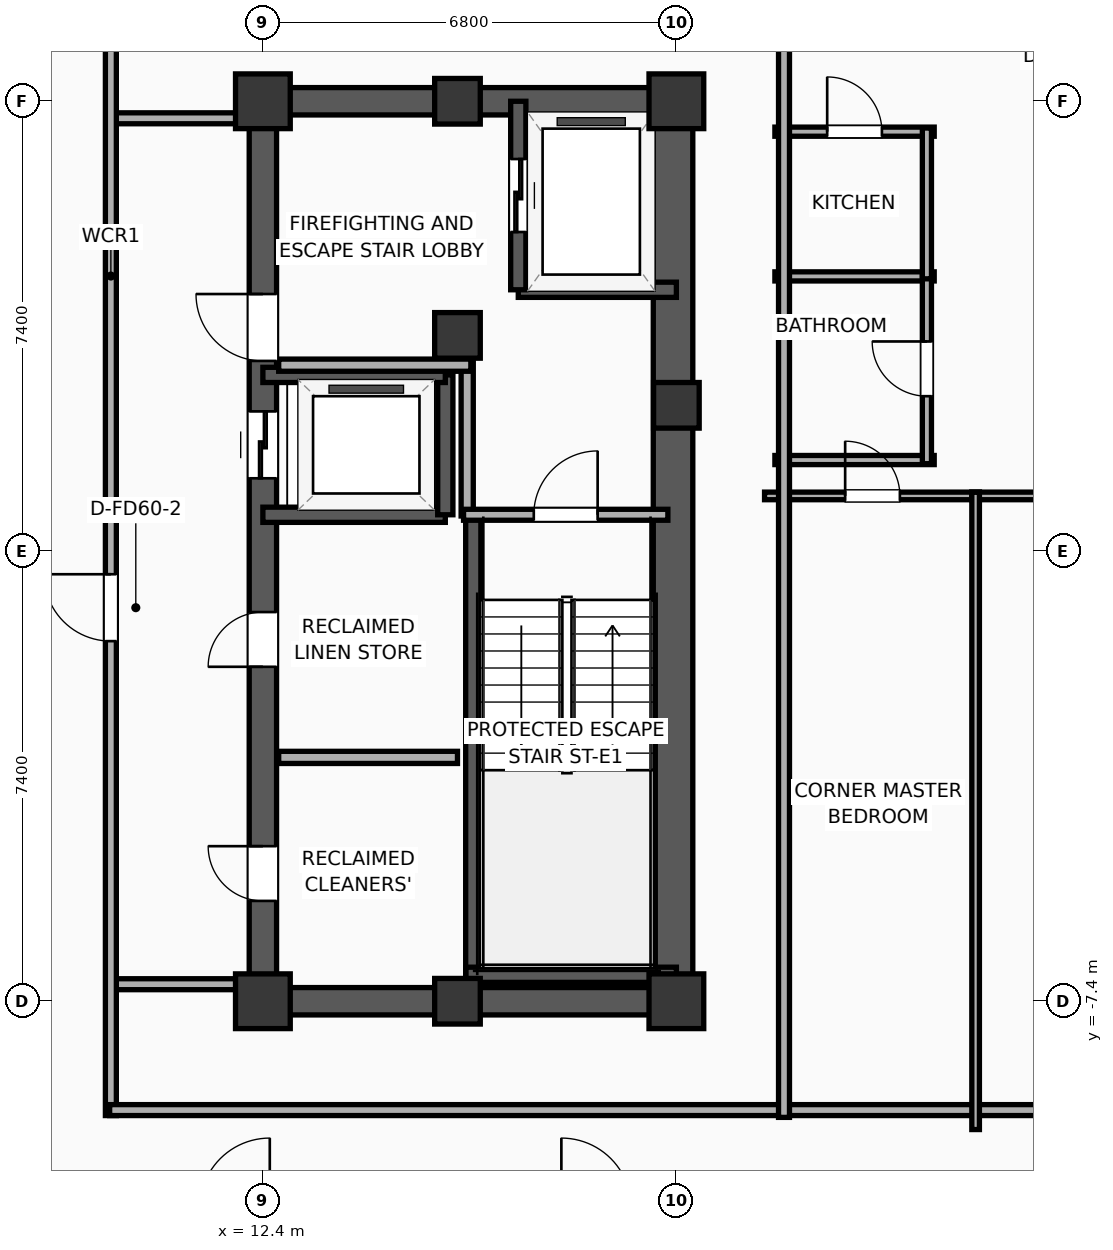
"""IFC4 building model, lengths in metres.
Left out: names, types, materials, properties, quantities, classifications, styles, units other than length and angle.
Written with IfcOpenShell. Run it as: python <this file> out.ifc"""

import sys

from ifc_helpers import new_model, si_unit, direction, frame, frame_2d, origin, origin_2d, place, context, subcontext, project, spatial, rectangle, extrude, element, fill, save


model = new_model("IFC4")
c1 = context("Model", 3, precision=1e-05, world=origin(), true_north=direction((0.0, 1.0)))
c2 = subcontext(c1, "Body", "Model", "MODEL_VIEW")
j1 = project(units=[si_unit("LENGTHUNIT", "METRE"), si_unit("PLANEANGLEUNIT", "RADIAN")], contexts=[c1])
p1 = place(None, origin())
s1 = spatial("IfcSite", under=j1, at=p1, CompositionType="ELEMENT")
p2 = place(p1, origin())
s2 = spatial("IfcBuilding", under=s1, at=p2, CompositionType="ELEMENT")
p3 = place(p2, frame((0.0, 0.0, 223.6)))
s3 = spatial("IfcBuildingStorey", under=s2, at=p3, CompositionType="ELEMENT", Elevation=223.6)
p4 = place(p3, frame((12.4, -7.4, 0.0), z_axis=(0.0, 0.0, 1.0), x_axis=(1.0, 0.0, 0.0)))
e1 = element("IfcColumn", 1, at=p4, inside=s3, PredefinedType="COLUMN", context=c2, shape_type="SweptSolid", body=[
    extrude(rectangle(XDim=0.9, YDim=0.9, at=origin_2d()), origin(), (0.0, 0.0, 1.0), 3.9),
])
p5 = place(p3, frame((15.6, 3.55, 0.0), z_axis=(0.0, 0.0, 1.0), x_axis=(1.0, 0.0, 0.0)))
e2 = element("IfcColumn", 2, at=p5, inside=s3, PredefinedType="COLUMN", context=c2, shape_type="SweptSolid", body=[
    extrude(rectangle(XDim=0.75, YDim=0.75, at=origin_2d()), origin(), (0.0, 0.0, 1.0), 3.9),
])
p6 = place(p3, frame((12.4, 7.4, 0.0), z_axis=(0.0, 0.0, 1.0), x_axis=(1.0, 0.0, 0.0)))
e3 = element("IfcColumn", 3, at=p6, inside=s3, PredefinedType="COLUMN", context=c2, shape_type="SweptSolid", body=[
    extrude(rectangle(XDim=0.9, YDim=0.9, at=origin_2d()), origin(), (0.0, 0.0, 1.0), 3.9),
])
for number, where, z_axis, x_axis in (
    (4, (15.6, -7.4, 0.0), (0.0, 0.0, 1.0), (1.0, 0.0, 0.0)),
    (5, (15.6, 7.4, 0.0), (0.0, 0.0, 1.0), (1.0, 0.0, 0.0)),
):
    element("IfcColumn", number, at=place(p3, frame(where, z_axis=z_axis, x_axis=x_axis)), inside=s3, PredefinedType="COLUMN", context=c2, shape_type="SweptSolid", body=[
        extrude(rectangle(XDim=0.75, YDim=0.75, at=origin_2d()), origin(), (0.0, 0.0, 1.0), 3.9),
    ])
p7 = place(p3, frame((19.2, -7.4, 0.0), z_axis=(0.0, 0.0, 1.0), x_axis=(1.0, 0.0, 0.0)))
e6 = element("IfcColumn", 6, at=p7, inside=s3, PredefinedType="COLUMN", context=c2, shape_type="SweptSolid", body=[
    extrude(rectangle(XDim=0.9, YDim=0.9, at=origin_2d()), origin(), (0.0, 0.0, 1.0), 3.9),
])
p8 = place(p3, frame((19.2, 2.4, 0.0), z_axis=(0.0, 0.0, 1.0), x_axis=(1.0, 0.0, 0.0)))
e7 = element("IfcColumn", 7, at=p8, inside=s3, PredefinedType="COLUMN", context=c2, shape_type="SweptSolid", body=[
    extrude(rectangle(XDim=0.75, YDim=0.75, at=origin_2d()), origin(), (0.0, 0.0, 1.0), 3.9),
])
p9 = place(p3, frame((19.2, 7.4, 0.0), z_axis=(0.0, 0.0, 1.0), x_axis=(1.0, 0.0, 0.0)))
e8 = element("IfcColumn", 8, at=p9, inside=s3, PredefinedType="COLUMN", context=c2, shape_type="SweptSolid", body=[
    extrude(rectangle(XDim=0.9, YDim=0.9, at=origin_2d()), origin(), (0.0, 0.0, 1.0), 3.9),
])
for number, where, z_axis, x_axis in (
    (9, (12.175, -7.4, 0.0), (0.0, 0.0, 1.0), (1.0, 0.0, 0.0)),
    (10, (12.175, 7.4, 0.0), (0.0, 0.0, 1.0), (1.0, 0.0, 0.0)),
):
    element("IfcWall", number, at=place(p3, frame(where, z_axis=z_axis, x_axis=x_axis)), inside=s3, PredefinedType="SHEAR", context=c2, shape_type="SweptSolid", body=[
        extrude(rectangle(XDim=7.25, YDim=0.45, at=frame_2d((3.625, 0.0))), origin(), (0.0, 0.0, 1.0), 3.65),
    ])
p10 = place(p3, frame((12.4, -7.4, 0.0), z_axis=(0.0, 0.0, 1.0), x_axis=(0.0, 1.0, 0.0)))
e11 = element("IfcWall", 11, at=p10, inside=s3, PredefinedType="SHEAR", context=c2, shape_type="SweptSolid", body=[
    extrude(rectangle(XDim=14.8, YDim=0.45, at=frame_2d((7.4, 0.0))), origin(), (0.0, 0.0, 1.0), 3.65),
])
p11 = place(p10, frame((8.6, 0.0, 0.0)))
e12 = element("IfcOpeningElement", 12, at=p11, cuts=e11, PredefinedType="OPENING", context=c2, shape_type="SweptSolid", body=[
    extrude(rectangle(XDim=1.1, YDim=2.05, at=frame_2d((0.55, 1.025))), frame((0.0, 0.235, 0.0), z_axis=(0.0, -1.0, 0.0), x_axis=(1.0, 0.0, 0.0)), (0.0, 0.0, 1.0), 0.47),
])
p12 = place(p10, frame((10.53, 0.0, 0.0)))
e13 = element("IfcOpeningElement", 13, at=p12, cuts=e11, PredefinedType="OPENING", context=c2, shape_type="SweptSolid", body=[
    extrude(rectangle(XDim=1.1, YDim=2.05, at=frame_2d((0.55, 1.025))), frame((0.0, 0.235, 0.0), z_axis=(0.0, -1.0, 0.0), x_axis=(1.0, 0.0, 0.0)), (0.0, 0.0, 1.0), 0.47),
])
p13 = place(p10, frame((1.65, 0.0, 0.0)))
e14 = element("IfcOpeningElement", 14, at=p13, cuts=e11, PredefinedType="OPENING", context=c2, shape_type="SweptSolid", body=[
    extrude(rectangle(XDim=0.9, YDim=2.05, at=frame_2d((0.45, 1.025))), frame((0.0, 0.235, 0.0), z_axis=(0.0, -1.0, 0.0), x_axis=(1.0, 0.0, 0.0)), (0.0, 0.0, 1.0), 0.47),
])
p14 = place(p10, frame((5.5, 0.0, 0.0)))
e15 = element("IfcOpeningElement", 15, at=p14, cuts=e11, PredefinedType="OPENING", context=c2, shape_type="SweptSolid", body=[
    extrude(rectangle(XDim=0.9, YDim=2.05, at=frame_2d((0.45, 1.025))), frame((0.0, 0.235, 0.0), z_axis=(0.0, -1.0, 0.0), x_axis=(1.0, 0.0, 0.0)), (0.0, 0.0, 1.0), 0.47),
])
p15 = place(p3, frame((19.145, -7.4, 0.0), z_axis=(0.0, 0.0, 1.0), x_axis=(0.0, 1.0, 0.0)))
e16 = element("IfcWall", 16, at=p15, inside=s3, PredefinedType="SHEAR", context=c2, shape_type="SweptSolid", body=[
    extrude(rectangle(XDim=14.8, YDim=0.65, at=frame_2d((7.4, 0.0))), origin(), (0.0, 0.0, 1.0), 3.65),
])
p16 = place(p3, frame((15.86, -7.085, 0.0), z_axis=(0.0, 0.0, 1.0), x_axis=(0.0, 1.0, 0.0)))
e17 = element("IfcWall", 17, at=p16, inside=s3, PredefinedType="SOLIDWALL", context=c2, shape_type="SweptSolid", body=[
    extrude(rectangle(XDim=7.685, YDim=0.25, at=frame_2d((3.843, 0.0))), origin(), (0.0, 0.0, 1.0), 3.65),
])
p17 = place(p3, frame((15.74, -6.965, 0.0), z_axis=(0.0, 0.0, 1.0), x_axis=(1.0, 0.0, 0.0)))
e18 = element("IfcWall", 18, at=p17, inside=s3, PredefinedType="SOLIDWALL", context=c2, shape_type="SweptSolid", body=[
    extrude(rectangle(XDim=3.46, YDim=0.25, at=frame_2d((1.73, 0.0))), origin(), (0.0, 0.0, 1.0), 3.65),
])
p18 = place(p3, frame((16.6, 4.3, 0.0), z_axis=(0.0, 0.0, 1.0), x_axis=(1.0, 0.0, 0.0)))
e19 = element("IfcWall", 19, at=p18, inside=s3, PredefinedType="SOLIDWALL", context=c2, shape_type="SweptSolid", body=[
    extrude(rectangle(XDim=2.6, YDim=0.25, at=frame_2d((1.3, 0.0))), origin(), (0.0, 0.0, 1.0), 3.65),
])
p19 = place(p3, frame((16.6, 7.4, 0.0), z_axis=(0.0, 0.0, 1.0), x_axis=(0.0, -1.0, 0.0)))
e20 = element("IfcWall", 20, at=p19, inside=s3, PredefinedType="SOLIDWALL", context=c2, shape_type="SweptSolid", body=[
    extrude(rectangle(XDim=3.1, YDim=0.25, at=frame_2d((1.55, 0.0))), origin(), (0.0, 0.0, 1.0), 3.65),
])
p20 = place(p19, frame((0.95, 0.0, 0.0)))
e21 = element("IfcOpeningElement", 21, at=p20, cuts=e20, PredefinedType="OPENING", context=c2, shape_type="SweptSolid", body=[
    extrude(rectangle(XDim=1.2, YDim=2.05, at=frame_2d((0.6, 1.025))), frame((0.0, 0.135, 0.0), z_axis=(0.0, -1.0, 0.0), x_axis=(1.0, 0.0, 0.0)), (0.0, 0.0, 1.0), 0.27),
])
p21 = place(p3, frame((12.4, 0.6, 0.0), z_axis=(0.0, 0.0, 1.0), x_axis=(1.0, 0.0, 0.0)))
e22 = element("IfcWall", 22, at=p21, inside=s3, PredefinedType="SOLIDWALL", context=c2, shape_type="SweptSolid", body=[
    extrude(rectangle(XDim=3.0, YDim=0.25, at=frame_2d((1.5, 0.0))), origin(), (0.0, 0.0, 1.0), 3.65),
])
p22 = place(p3, frame((15.4, 0.6, 0.0), z_axis=(0.0, 0.0, 1.0), x_axis=(0.0, 1.0, 0.0)))
e23 = element("IfcWall", 23, at=p22, inside=s3, PredefinedType="SOLIDWALL", context=c2, shape_type="SweptSolid", body=[
    extrude(rectangle(XDim=2.3, YDim=0.25, at=frame_2d((1.15, 0.0))), origin(), (0.0, 0.0, 1.0), 3.65),
])
p23 = place(p3, frame((15.4, 2.9, 0.0), z_axis=(0.0, 0.0, 1.0), x_axis=(-1.0, 0.0, 0.0)))
e24 = element("IfcWall", 24, at=p23, inside=s3, PredefinedType="SOLIDWALL", context=c2, shape_type="SweptSolid", body=[
    extrude(rectangle(XDim=3.0, YDim=0.25, at=frame_2d((1.5, 0.0))), origin(), (0.0, 0.0, 1.0), 3.65),
])
p24 = place(p3, frame((15.76, 0.58, 0.0), z_axis=(0.0, 0.0, 1.0), x_axis=(0.0, 1.0, 0.0)))
e25 = element("IfcWall", 25, at=p24, inside=s3, PredefinedType="PARTITIONING", context=c2, shape_type="SweptSolid", body=[
    extrude(rectangle(XDim=2.52, YDim=0.2, at=frame_2d((1.26, 0.0))), origin(), (0.0, 0.0, 1.0), 3.65),
])
p25 = place(p3, frame((12.66, 3.06, 0.0), z_axis=(0.0, 0.0, 1.0), x_axis=(1.0, 0.0, 0.0)))
e26 = element("IfcWall", 26, at=p25, inside=s3, PredefinedType="PARTITIONING", context=c2, shape_type="SweptSolid", body=[
    extrude(rectangle(XDim=3.16, YDim=0.2, at=frame_2d((1.58, 0.0))), origin(), (0.0, 0.0, 1.0), 3.65),
])
p26 = place(p3, frame((15.7, 0.6, 0.0), z_axis=(0.0, 0.0, 1.0), x_axis=(1.0, 0.0, 0.0)))
e27 = element("IfcWall", 27, at=p26, inside=s3, PredefinedType="PARTITIONING", context=c2, shape_type="SweptSolid", body=[
    extrude(rectangle(XDim=3.36, YDim=0.18, at=frame_2d((1.68, 0.0))), origin(), (0.0, 0.0, 1.0), 3.65),
])
p27 = place(p26, frame((1.155, 0.0, 0.0)))
e28 = element("IfcOpeningElement", 28, at=p27, cuts=e27, PredefinedType="OPENING", context=c2, shape_type="SweptSolid", body=[
    extrude(rectangle(XDim=1.05, YDim=2.05, at=frame_2d((0.525, 1.025))), frame((0.0, 0.1, 0.0), z_axis=(0.0, -1.0, 0.0), x_axis=(1.0, 0.0, 0.0)), (0.0, 0.0, 1.0), 0.2),
])
p28 = place(p3, frame((12.66, -3.39, 0.0), z_axis=(0.0, 0.0, 1.0), x_axis=(1.0, 0.0, 0.0)))
e29 = element("IfcWall", 29, at=p28, inside=s3, PredefinedType="PARTITIONING", context=c2, shape_type="SweptSolid", body=[
    extrude(rectangle(XDim=2.94, YDim=0.2, at=frame_2d((1.47, 0.0))), origin(), (0.0, 0.0, 1.0), 3.65),
])
for number, where, z_axis, x_axis in (
    (30, (9.88, 7.12, 0.0), (0.0, 0.0, 1.0), (1.0, 0.0, 0.0)),
    (31, (9.88, -7.12, 0.0), (0.0, 0.0, 1.0), (1.0, 0.0, 0.0)),
):
    element("IfcWall", number, at=place(p3, frame(where, z_axis=z_axis, x_axis=x_axis)), inside=s3, PredefinedType="PARTITIONING", context=c2, shape_type="SweptSolid", body=[
        extrude(rectangle(XDim=2.27, YDim=0.18, at=frame_2d((1.135, 0.0))), origin(), (0.0, 0.0, 1.0), 3.65),
    ])
p29 = place(p3, frame((9.9, -9.28, 0.0), z_axis=(0.0, 0.0, 1.0), x_axis=(0.0, 1.0, 0.0)))
e32 = element("IfcWall", 32, at=p29, inside=s3, PredefinedType="PARTITIONING", context=c2, shape_type="SweptSolid", body=[
    extrude(rectangle(XDim=18.56, YDim=0.18, at=frame_2d((9.28, 0.0))), origin(), (0.0, 0.0, 1.0), 3.65),
])
p30 = place(p29, frame((7.802, 0.0, 0.0)))
e33 = element("IfcOpeningElement", 33, at=p30, cuts=e32, PredefinedType="OPENING", context=c2, shape_type="SweptSolid", body=[
    extrude(rectangle(XDim=1.1, YDim=2.05, at=frame_2d((0.55, 1.025))), frame((0.0, 0.1, 0.0), z_axis=(0.0, -1.0, 0.0), x_axis=(1.0, 0.0, 0.0)), (0.0, 0.0, 1.0), 0.2),
])
p31 = place(p3, frame((9.88, -9.19, 0.0), z_axis=(0.0, 0.0, 1.0), x_axis=(1.0, 0.0, 0.0)))
e34 = element("IfcWall", 34, at=p31, inside=s3, PredefinedType="PARTITIONING", context=c2, shape_type="SweptSolid", body=[
    extrude(rectangle(XDim=20.35, YDim=0.18, at=frame_2d((10.175, 0.0))), origin(), (0.0, 0.0, 1.0), 3.65),
])
p32 = place(p3, frame((20.82, 6.9, 0.0), z_axis=(0.0, 0.0, 1.0), x_axis=(1.0, 0.0, 0.0)))
e35 = element("IfcWall", 35, at=p32, inside=s3, PredefinedType="PLUMBINGWALL", context=c2, shape_type="SweptSolid", body=[
    extrude(rectangle(XDim=2.62, YDim=0.15, at=frame_2d((1.31, 0.0))), origin(), (0.0, 0.0, 1.0), 3.65),
])
p33 = place(p32, frame((0.86, 0.0, 0.0)))
e36 = element("IfcOpeningElement", 36, at=p33, cuts=e35, PredefinedType="OPENING", context=c2, shape_type="SweptSolid", body=[
    extrude(rectangle(XDim=0.9, YDim=2.05, at=frame_2d((0.45, 1.025))), frame((0.0, 0.085, 0.0), z_axis=(0.0, -1.0, 0.0), x_axis=(1.0, 0.0, 0.0)), (0.0, 0.0, 1.0), 0.17),
])
for number, where, z_axis, x_axis in (
    (37, (20.82, 4.52, 0.0), (0.0, 0.0, 1.0), (1.0, 0.0, 0.0)),
    (38, (20.82, 1.5, 0.0), (0.0, 0.0, 1.0), (1.0, 0.0, 0.0)),
):
    element("IfcWall", number, at=place(p3, frame(where, z_axis=z_axis, x_axis=x_axis)), inside=s3, PredefinedType="PLUMBINGWALL", context=c2, shape_type="SweptSolid", body=[
        extrude(rectangle(XDim=2.62, YDim=0.15, at=frame_2d((1.31, 0.0))), origin(), (0.0, 0.0, 1.0), 3.65),
    ])
p34 = place(p3, frame((23.32, 1.44, 0.0), z_axis=(0.0, 0.0, 1.0), x_axis=(0.0, 1.0, 0.0)))
e39 = element("IfcWall", 39, at=p34, inside=s3, PredefinedType="PLUMBINGWALL", context=c2, shape_type="SweptSolid", body=[
    extrude(rectangle(XDim=3.12, YDim=0.15, at=frame_2d((1.56, 0.0))), origin(), (0.0, 0.0, 1.0), 3.65),
])
p35 = place(p34, frame((1.11, 0.0, 0.0)))
e40 = element("IfcOpeningElement", 40, at=p35, cuts=e39, PredefinedType="OPENING", context=c2, shape_type="SweptSolid", body=[
    extrude(rectangle(XDim=0.9, YDim=2.05, at=frame_2d((0.45, 1.025))), frame((0.0, 0.085, 0.0), z_axis=(0.0, -1.0, 0.0), x_axis=(1.0, 0.0, 0.0)), (0.0, 0.0, 1.0), 0.17),
])
p36 = place(p3, frame((23.32, 4.48, 0.0), z_axis=(0.0, 0.0, 1.0), x_axis=(0.0, 1.0, 0.0)))
e41 = element("IfcWall", 41, at=p36, inside=s3, PredefinedType="PLUMBINGWALL", context=c2, shape_type="SweptSolid", body=[
    extrude(rectangle(XDim=2.48, YDim=0.15, at=frame_2d((1.24, 0.0))), origin(), (0.0, 0.0, 1.0), 3.65),
])
p37 = place(p3, frame((20.65, 0.91, 0.0), z_axis=(0.0, 0.0, 1.0), x_axis=(1.0, 0.0, 0.0)))
e42 = element("IfcWall", 42, at=p37, inside=s3, PredefinedType="PARTITIONING", context=c2, shape_type="SweptSolid", body=[
    extrude(rectangle(XDim=3.534, YDim=0.125, at=frame_2d((1.767, 0.0))), origin(), (0.0, 0.0, 1.0), 3.65),
])
p38 = place(p37, frame((1.325, 0.0, 0.0)))
e43 = element("IfcOpeningElement", 43, at=p38, cuts=e42, PredefinedType="OPENING", context=c2, shape_type="SweptSolid", body=[
    extrude(rectangle(XDim=0.9, YDim=2.05, at=frame_2d((0.45, 1.025))), frame((0.0, 0.073, 0.0), z_axis=(0.0, -1.0, 0.0), x_axis=(1.0, 0.0, 0.0)), (0.0, 0.0, 1.0), 0.145),
])
p39 = place(p3, frame((24.059, 0.91, 0.0), z_axis=(0.0, 0.0, 1.0), x_axis=(1.0, 0.0, 0.0)))
e44 = element("IfcWall", 44, at=p39, inside=s3, PredefinedType="PARTITIONING", context=c2, shape_type="SweptSolid", body=[
    extrude(rectangle(XDim=3.183, YDim=0.125, at=frame_2d((1.591, 0.0))), origin(), (0.0, 0.0, 1.0), 3.65),
])
p40 = place(p39, frame((1.142, 0.0, 0.0)))
e45 = element("IfcOpeningElement", 45, at=p40, cuts=e44, PredefinedType="OPENING", context=c2, shape_type="SweptSolid", body=[
    extrude(rectangle(XDim=0.9, YDim=2.05, at=frame_2d((0.45, 1.025))), frame((0.0, 0.073, 0.0), z_axis=(0.0, -1.0, 0.0), x_axis=(1.0, 0.0, 0.0)), (0.0, 0.0, 1.0), 0.145),
])
p41 = place(p3, frame((24.121, -9.51, 0.0), z_axis=(0.0, 0.0, 1.0), x_axis=(0.0, 1.0, 0.0)))
e46 = element("IfcWall", 46, at=p41, inside=s3, PredefinedType="PARTITIONING", context=c2, shape_type="SweptSolid", body=[
    extrude(rectangle(XDim=10.48, YDim=0.125, at=frame_2d((5.24, 0.0))), origin(), (0.0, 0.0, 1.0), 3.65),
])
p42 = place(p3, frame((20.97, -9.31, 0.0), z_axis=(0.0, 0.0, 1.0), x_axis=(0.0, 1.0, 0.0)))
e47 = element("IfcWall", 47, at=p42, inside=s3, PredefinedType="PARTITIONING", context=c2, shape_type="SweptSolid", body=[
    extrude(rectangle(XDim=18.62, YDim=0.18, at=frame_2d((9.31, 0.0))), origin(), (0.0, 0.0, 1.0), 3.65),
])
p43 = place(p20, origin())
e48 = element("IfcDoor", 48, at=p43, inside=s3, OperationType="SLIDING_TO_LEFT", PredefinedType="DOOR", context=c2, shape_type="SweptSolid", body=[
    extrude(rectangle(XDim=1.2, YDim=2.05, at=frame_2d((0.6, 1.025))), frame((0.0, 0.025, 0.0), z_axis=(0.0, -1.0, 0.0), x_axis=(1.0, 0.0, 0.0)), (0.0, 0.0, 1.0), 0.05),
])
fill(e21, e48)
p44 = place(p11, origin())
e49 = element("IfcDoor", 49, at=p44, inside=s3, OperationType="SLIDING_TO_LEFT", PredefinedType="DOOR", context=c2, shape_type="SweptSolid", body=[
    extrude(rectangle(XDim=1.1, YDim=2.05, at=frame_2d((0.55, 1.025))), frame((0.0, 0.025, 0.0), z_axis=(0.0, -1.0, 0.0), x_axis=(1.0, 0.0, 0.0)), (0.0, 0.0, 1.0), 0.05),
])
fill(e12, e49)
p45 = place(p27, origin())
e50 = element("IfcDoor", 50, at=p45, inside=s3, OperationType="SINGLE_SWING_RIGHT", PredefinedType="DOOR", context=c2, shape_type="SweptSolid", body=[
    extrude(rectangle(XDim=1.05, YDim=2.05, at=frame_2d((0.525, 1.025))), frame((0.0, 0.025, 0.0), z_axis=(0.0, -1.0, 0.0), x_axis=(1.0, 0.0, 0.0)), (0.0, 0.0, 1.0), 0.05),
])
fill(e28, e50)
p46 = place(p30, origin())
e51 = element("IfcDoor", 51, at=p46, inside=s3, OperationType="SINGLE_SWING_RIGHT", PredefinedType="DOOR", context=c2, shape_type="SweptSolid", body=[
    extrude(rectangle(XDim=1.1, YDim=2.05, at=frame_2d((0.55, 1.025))), frame((0.0, 0.025, 0.0), z_axis=(0.0, -1.0, 0.0), x_axis=(1.0, 0.0, 0.0)), (0.0, 0.0, 1.0), 0.05),
])
fill(e33, e51)
p47 = place(p33, origin())
e52 = element("IfcDoor", 52, at=p47, inside=s3, OperationType="SINGLE_SWING_LEFT", PredefinedType="DOOR", context=c2, shape_type="SweptSolid", body=[
    extrude(rectangle(XDim=0.9, YDim=2.05, at=frame_2d((0.45, 1.025))), frame((0.0, 0.025, 0.0), z_axis=(0.0, -1.0, 0.0), x_axis=(1.0, 0.0, 0.0)), (0.0, 0.0, 1.0), 0.05),
])
fill(e36, e52)
p48 = place(p35, origin())
e53 = element("IfcDoor", 53, at=p48, inside=s3, OperationType="SINGLE_SWING_RIGHT", PredefinedType="DOOR", context=c2, shape_type="SweptSolid", body=[
    extrude(rectangle(XDim=0.9, YDim=2.05, at=frame_2d((0.45, 1.025))), frame((0.0, 0.025, 0.0), z_axis=(0.0, -1.0, 0.0), x_axis=(1.0, 0.0, 0.0)), (0.0, 0.0, 1.0), 0.05),
])
fill(e40, e53)
p49 = place(p38, origin())
e54 = element("IfcDoor", 54, at=p49, inside=s3, OperationType="SINGLE_SWING_LEFT", PredefinedType="DOOR", context=c2, shape_type="SweptSolid", body=[
    extrude(rectangle(XDim=0.9, YDim=2.05, at=frame_2d((0.45, 1.025))), frame((0.0, 0.025, 0.0), z_axis=(0.0, -1.0, 0.0), x_axis=(1.0, 0.0, 0.0)), (0.0, 0.0, 1.0), 0.05),
])
fill(e43, e54)
p50 = place(p12, origin())
e55 = element("IfcDoor", 55, at=p50, inside=s3, OperationType="SINGLE_SWING_RIGHT", PredefinedType="DOOR", context=c2, shape_type="SweptSolid", body=[
    extrude(rectangle(XDim=1.1, YDim=2.05, at=frame_2d((0.55, 1.025))), frame((0.0, 0.025, 0.0), z_axis=(0.0, -1.0, 0.0), x_axis=(1.0, 0.0, 0.0)), (0.0, 0.0, 1.0), 0.05),
])
fill(e13, e55)
p51 = place(p13, origin())
e56 = element("IfcDoor", 56, at=p51, inside=s3, OperationType="SINGLE_SWING_RIGHT", PredefinedType="DOOR", context=c2, shape_type="SweptSolid", body=[
    extrude(rectangle(XDim=0.9, YDim=2.05, at=frame_2d((0.45, 1.025))), frame((0.0, 0.025, 0.0), z_axis=(0.0, -1.0, 0.0), x_axis=(1.0, 0.0, 0.0)), (0.0, 0.0, 1.0), 0.05),
])
fill(e14, e56)
p52 = place(p14, origin())
e57 = element("IfcDoor", 57, at=p52, inside=s3, OperationType="SINGLE_SWING_LEFT", PredefinedType="DOOR", context=c2, shape_type="SweptSolid", body=[
    extrude(rectangle(XDim=0.9, YDim=2.05, at=frame_2d((0.45, 1.025))), frame((0.0, 0.025, 0.0), z_axis=(0.0, -1.0, 0.0), x_axis=(1.0, 0.0, 0.0)), (0.0, 0.0, 1.0), 0.05),
])
fill(e15, e57)
save(model, sys.argv[1])
